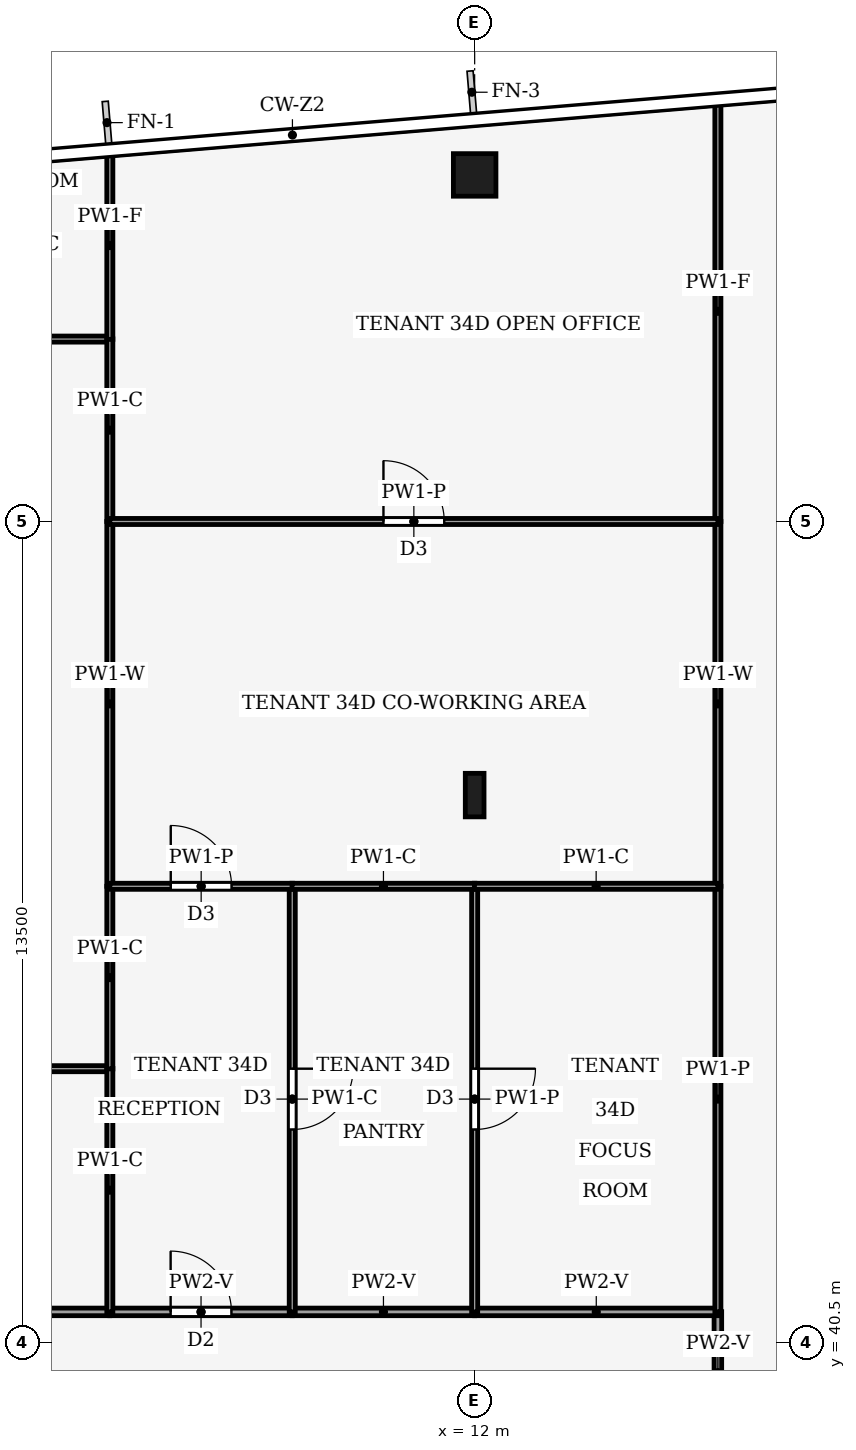
"""IFC4 building model, lengths in metres.
Left out: names, types, materials, properties, quantities, classifications, styles, units other than length and angle.
Written with IfcOpenShell. Run it as: python <this file> out.ifc"""

import sys

from ifc_helpers import new_model, si_unit, direction, frame, frame_2d, origin, origin_2d, place, context, subcontext, project, spatial, rectangle, hollow_rectangle, i_section, extrude, element, fill, save


model = new_model("IFC4")
c1 = context("Model", 3, precision=1e-05, world=origin(), true_north=direction((0.0, 1.0)))
c2 = subcontext(c1, "Body", "Model", "MODEL_VIEW")
j1 = project(units=[si_unit("LENGTHUNIT", "METRE"), si_unit("PLANEANGLEUNIT", "RADIAN")], contexts=[c1])
p1 = place(None, origin())
s1 = spatial("IfcSite", under=j1, at=p1, CompositionType="ELEMENT")
p2 = place(p1, origin())
s2 = spatial("IfcBuilding", under=s1, at=p2, CompositionType="ELEMENT")
p3 = place(p2, frame((0.0, 0.0, 150.0)))
s3 = spatial("IfcBuildingStorey", under=s2, at=p3, CompositionType="ELEMENT", Elevation=150.0)
p4 = place(p3, frame((12.0, 59.7, 0.0), z_axis=(0.0, 0.0, 1.0), x_axis=(1.0, 0.0, 0.0)))
e1 = element("IfcColumn", 1, at=p4, inside=s3, PredefinedType="COLUMN", context=c2, shape_type="SweptSolid", body=[
    extrude(hollow_rectangle(XDim=0.7, YDim=0.7, WallThickness=0.03, at=origin_2d()), origin(), (0.0, 0.0, 1.0), 4.0),
])
p5 = place(p3, frame((12.0, 49.5, 0.0), z_axis=(0.0, 0.0, 1.0), x_axis=(1.0, 0.0, 0.0)))
e2 = element("IfcColumn", 2, at=p5, inside=s3, PredefinedType="COLUMN", context=c2, shape_type="SweptSolid", body=[
    extrude(i_section(OverallWidth=0.308, OverallDepth=0.716, WebThickness=0.021, FlangeThickness=0.04, FilletRadius=0.027, at=origin_2d()), origin(), (0.0, 0.0, 1.0), 4.0),
])
p6 = place(p3, frame((16.0, 39.0, 0.0), z_axis=(0.0, 0.0, 1.0), x_axis=(0.0, 1.0, 0.0)))
e3 = element("IfcWall", 3, at=p6, inside=s3, PredefinedType="PARTITIONING", context=c2, shape_type="SweptSolid", body=[
    extrude(rectangle(XDim=2.004, YDim=0.125, at=frame_2d((1.002, 0.0))), origin(), (0.0, 0.0, 1.0), 3.44),
])
p7 = place(p3, frame((-6.0, 41.0, 0.0), z_axis=(0.0, 0.0, 1.0), x_axis=(1.0, 0.0, 0.0)))
e4 = element("IfcWall", 4, at=p7, inside=s3, PredefinedType="PARTITIONING", context=c2, shape_type="SweptSolid", body=[
    extrude(rectangle(XDim=12.0, YDim=0.125, at=frame_2d((6.0, 0.0))), origin(), (0.0, 0.0, 1.0), 3.44),
])
p8 = place(p7, frame((5.5, 0.0, 0.0)))
e5 = element("IfcOpeningElement", 5, at=p8, cuts=e4, PredefinedType="OPENING", context=c2, shape_type="SweptSolid", body=[
    extrude(rectangle(XDim=1.0, YDim=2.1, at=frame_2d((0.5, 1.05))), frame((0.0, 0.073, 0.0), z_axis=(0.0, -1.0, 0.0), x_axis=(1.0, 0.0, 0.0)), (0.0, 0.0, 1.0), 0.145),
])
p9 = place(p3, frame((6.0, 41.0, 0.0), z_axis=(0.0, 0.0, 1.0), x_axis=(1.0, 0.0, 0.0)))
e6 = element("IfcWall", 6, at=p9, inside=s3, PredefinedType="PARTITIONING", context=c2, shape_type="SweptSolid", body=[
    extrude(rectangle(XDim=3.0, YDim=0.125, at=frame_2d((1.5, 0.0))), origin(), (0.0, 0.0, 1.0), 3.44),
])
p10 = place(p9, frame((1.0, 0.0, 0.0)))
e7 = element("IfcOpeningElement", 7, at=p10, cuts=e6, PredefinedType="OPENING", context=c2, shape_type="SweptSolid", body=[
    extrude(rectangle(XDim=1.0, YDim=2.1, at=frame_2d((0.5, 1.05))), frame((0.0, 0.073, 0.0), z_axis=(0.0, -1.0, 0.0), x_axis=(1.0, 0.0, 0.0)), (0.0, 0.0, 1.0), 0.145),
])
p11 = place(p3, frame((12.0, 41.0, 0.0), z_axis=(0.0, 0.0, 1.0), x_axis=(-1.0, 0.0, 0.0)))
e8 = element("IfcWall", 8, at=p11, inside=s3, PredefinedType="PARTITIONING", context=c2, shape_type="SweptSolid", body=[
    extrude(rectangle(XDim=3.0, YDim=0.125, at=frame_2d((1.5, 0.0))), origin(), (0.0, 0.0, 1.0), 3.44),
])
p12 = place(p3, frame((16.0, 41.0, 0.0), z_axis=(0.0, 0.0, 1.0), x_axis=(-1.0, 0.0, 0.0)))
e9 = element("IfcWall", 9, at=p12, inside=s3, PredefinedType="PARTITIONING", context=c2, shape_type="SweptSolid", body=[
    extrude(rectangle(XDim=4.0, YDim=0.125, at=frame_2d((2.0, 0.0))), origin(), (0.0, 0.0, 1.0), 3.44),
])
p13 = place(p3, frame((16.0, 48.0, 0.0), z_axis=(0.0, 0.0, 1.0), x_axis=(0.0, -1.0, 0.0)))
e10 = element("IfcWall", 10, at=p13, inside=s3, PredefinedType="PARTITIONING", context=c2, shape_type="SweptSolid", body=[
    extrude(rectangle(XDim=7.0, YDim=0.1, at=frame_2d((3.5, 0.0))), origin(), (0.0, 0.0, 1.0), 3.44),
])
p14 = place(p3, frame((16.0, 54.0, 0.0), z_axis=(0.0, 0.0, 1.0), x_axis=(0.0, -1.0, 0.0)))
e11 = element("IfcWall", 11, at=p14, inside=s3, PredefinedType="PARTITIONING", context=c2, shape_type="SweptSolid", body=[
    extrude(rectangle(XDim=6.0, YDim=0.1, at=frame_2d((3.0, 0.0))), origin(), (0.0, 0.0, 1.0), 3.24),
])
p15 = place(p3, frame((16.0, 60.913, 0.0), z_axis=(0.0, 0.0, 1.0), x_axis=(0.0, -1.0, 0.0)))
e12 = element("IfcWall", 12, at=p15, inside=s3, PredefinedType="PARTITIONING", context=c2, shape_type="SweptSolid", body=[
    extrude(rectangle(XDim=6.913, YDim=0.1, at=frame_2d((3.457, 0.0))), origin(), (0.0, 0.0, 1.0), 3.04),
])
p16 = place(p3, frame((-6.004, 45.0, 0.0), z_axis=(0.0, 0.0, 1.0), x_axis=(1.0, 0.0, 0.0)))
e13 = element("IfcWall", 13, at=p16, inside=s3, PredefinedType="PARTITIONING", context=c2, shape_type="SweptSolid", body=[
    extrude(rectangle(XDim=12.004, YDim=0.1, at=frame_2d((6.002, 0.0))), origin(), (0.0, 0.0, 1.0), 3.44),
])
p17 = place(p16, frame((5.102, 0.0, 0.0)))
e14 = element("IfcOpeningElement", 14, at=p17, cuts=e13, PredefinedType="OPENING", context=c2, shape_type="SweptSolid", body=[
    extrude(rectangle(XDim=1.8, YDim=2.1, at=frame_2d((0.9, 1.05))), frame((0.0, 0.06, 0.0), z_axis=(0.0, -1.0, 0.0), x_axis=(1.0, 0.0, 0.0)), (0.0, 0.0, 1.0), 0.12),
])
p18 = place(p3, frame((6.0, 41.0, 0.0), z_axis=(0.0, 0.0, 1.0), x_axis=(0.0, 1.0, 0.0)))
e15 = element("IfcWall", 15, at=p18, inside=s3, PredefinedType="PARTITIONING", context=c2, shape_type="SweptSolid", body=[
    extrude(rectangle(XDim=4.004, YDim=0.1, at=frame_2d((2.002, 0.0))), origin(), (0.0, 0.0, 1.0), 3.87),
])
p19 = place(p3, frame((0.0, 57.0, 0.0), z_axis=(0.0, 0.0, 1.0), x_axis=(1.0, 0.0, 0.0)))
e16 = element("IfcWall", 16, at=p19, inside=s3, PredefinedType="PARTITIONING", context=c2, shape_type="SweptSolid", body=[
    extrude(rectangle(XDim=6.0, YDim=0.1, at=frame_2d((3.0, 0.0))), origin(), (0.0, 0.0, 1.0), 3.44),
])
p20 = place(p19, frame((3.7, 0.0, 0.0)))
e17 = element("IfcOpeningElement", 17, at=p20, cuts=e16, PredefinedType="OPENING", context=c2, shape_type="SweptSolid", body=[
    extrude(rectangle(XDim=1.0, YDim=2.1, at=frame_2d((0.5, 1.05))), frame((0.0, 0.06, 0.0), z_axis=(0.0, -1.0, 0.0), x_axis=(1.0, 0.0, 0.0)), (0.0, 0.0, 1.0), 0.12),
])
p21 = place(p3, frame((6.0, 44.996, 0.0), z_axis=(0.0, 0.0, 1.0), x_axis=(0.0, 1.0, 0.0)))
e18 = element("IfcWall", 18, at=p21, inside=s3, PredefinedType="PARTITIONING", context=c2, shape_type="SweptSolid", body=[
    extrude(rectangle(XDim=3.004, YDim=0.1, at=frame_2d((1.502, 0.0))), origin(), (0.0, 0.0, 1.0), 3.87),
])
p22 = place(p3, frame((6.0, 48.0, 0.0), z_axis=(0.0, 0.0, 1.0), x_axis=(0.0, 1.0, 0.0)))
e19 = element("IfcWall", 19, at=p22, inside=s3, PredefinedType="PARTITIONING", context=c2, shape_type="SweptSolid", body=[
    extrude(rectangle(XDim=6.0, YDim=0.1, at=frame_2d((3.0, 0.0))), origin(), (0.0, 0.0, 1.0), 3.24),
])
p23 = place(p3, frame((6.0, 54.0, 0.0), z_axis=(0.0, 0.0, 1.0), x_axis=(0.0, 1.0, 0.0)))
e20 = element("IfcWall", 20, at=p23, inside=s3, PredefinedType="PARTITIONING", context=c2, shape_type="SweptSolid", body=[
    extrude(rectangle(XDim=3.004, YDim=0.1, at=frame_2d((1.502, 0.0))), origin(), (0.0, 0.0, 1.0), 3.87),
])
p24 = place(p3, frame((6.0, 56.996, 0.0), z_axis=(0.0, 0.0, 1.0), x_axis=(0.0, 1.0, 0.0)))
e21 = element("IfcWall", 21, at=p24, inside=s3, PredefinedType="PARTITIONING", context=c2, shape_type="SweptSolid", body=[
    extrude(rectangle(XDim=3.084, YDim=0.1, at=frame_2d((1.542, 0.0))), origin(), (0.0, 0.0, 1.0), 3.04),
])
p25 = place(p3, frame((9.0, 48.0, 0.0), z_axis=(0.0, 0.0, 1.0), x_axis=(0.0, -1.0, 0.0)))
e22 = element("IfcWall", 22, at=p25, inside=s3, PredefinedType="PARTITIONING", context=c2, shape_type="SweptSolid", body=[
    extrude(rectangle(XDim=7.0, YDim=0.1, at=frame_2d((3.5, 0.0))), origin(), (0.0, 0.0, 1.0), 3.87),
])
p26 = place(p25, frame((3.0, 0.0, 0.0)))
e23 = element("IfcOpeningElement", 23, at=p26, cuts=e22, PredefinedType="OPENING", context=c2, shape_type="SweptSolid", body=[
    extrude(rectangle(XDim=1.0, YDim=2.1, at=frame_2d((0.5, 1.05))), frame((0.0, 0.06, 0.0), z_axis=(0.0, -1.0, 0.0), x_axis=(1.0, 0.0, 0.0)), (0.0, 0.0, 1.0), 0.12),
])
p27 = place(p3, frame((6.0, 48.0, 0.0), z_axis=(0.0, 0.0, 1.0), x_axis=(1.0, 0.0, 0.0)))
e24 = element("IfcWall", 24, at=p27, inside=s3, PredefinedType="PARTITIONING", context=c2, shape_type="SweptSolid", body=[
    extrude(rectangle(XDim=3.004, YDim=0.1, at=frame_2d((1.502, 0.0))), origin(), (0.0, 0.0, 1.0), 3.44),
])
p28 = place(p27, frame((1.002, 0.0, 0.0)))
e25 = element("IfcOpeningElement", 25, at=p28, cuts=e24, PredefinedType="OPENING", context=c2, shape_type="SweptSolid", body=[
    extrude(rectangle(XDim=1.0, YDim=2.1, at=frame_2d((0.5, 1.05))), frame((0.0, 0.06, 0.0), z_axis=(0.0, -1.0, 0.0), x_axis=(1.0, 0.0, 0.0)), (0.0, 0.0, 1.0), 0.12),
])
p29 = place(p3, frame((12.0, 48.0, 0.0), z_axis=(0.0, 0.0, 1.0), x_axis=(0.0, -1.0, 0.0)))
e26 = element("IfcWall", 26, at=p29, inside=s3, PredefinedType="PARTITIONING", context=c2, shape_type="SweptSolid", body=[
    extrude(rectangle(XDim=7.0, YDim=0.1, at=frame_2d((3.5, 0.0))), origin(), (0.0, 0.0, 1.0), 3.44),
])
p30 = place(p29, frame((3.0, 0.0, 0.0)))
e27 = element("IfcOpeningElement", 27, at=p30, cuts=e26, PredefinedType="OPENING", context=c2, shape_type="SweptSolid", body=[
    extrude(rectangle(XDim=1.0, YDim=2.1, at=frame_2d((0.5, 1.05))), frame((0.0, 0.06, 0.0), z_axis=(0.0, -1.0, 0.0), x_axis=(1.0, 0.0, 0.0)), (0.0, 0.0, 1.0), 0.12),
])
p31 = place(p3, frame((12.004, 48.0, 0.0), z_axis=(0.0, 0.0, 1.0), x_axis=(-1.0, 0.0, 0.0)))
e28 = element("IfcWall", 28, at=p31, inside=s3, PredefinedType="PARTITIONING", context=c2, shape_type="SweptSolid", body=[
    extrude(rectangle(XDim=3.008, YDim=0.1, at=frame_2d((1.504, 0.0))), origin(), (0.0, 0.0, 1.0), 3.87),
])
p32 = place(p3, frame((16.0, 48.0, 0.0), z_axis=(0.0, 0.0, 1.0), x_axis=(-1.0, 0.0, 0.0)))
e29 = element("IfcWall", 29, at=p32, inside=s3, PredefinedType="PARTITIONING", context=c2, shape_type="SweptSolid", body=[
    extrude(rectangle(XDim=4.004, YDim=0.1, at=frame_2d((2.002, 0.0))), origin(), (0.0, 0.0, 1.0), 3.87),
])
p33 = place(p3, frame((6.0, 54.0, 0.0), z_axis=(0.0, 0.0, 1.0), x_axis=(1.0, 0.0, 0.0)))
e30 = element("IfcWall", 30, at=p33, inside=s3, PredefinedType="PARTITIONING", context=c2, shape_type="SweptSolid", body=[
    extrude(rectangle(XDim=10.0, YDim=0.1, at=frame_2d((5.0, 0.0))), origin(), (0.0, 0.0, 1.0), 3.44),
])
p34 = place(p33, frame((4.5, 0.0, 0.0)))
e31 = element("IfcOpeningElement", 31, at=p34, cuts=e30, PredefinedType="OPENING", context=c2, shape_type="SweptSolid", body=[
    extrude(rectangle(XDim=1.0, YDim=2.1, at=frame_2d((0.5, 1.05))), frame((0.0, 0.06, 0.0), z_axis=(0.0, -1.0, 0.0), x_axis=(1.0, 0.0, 0.0)), (0.0, 0.0, 1.0), 0.12),
])
p35 = place(p10, origin())
e32 = element("IfcDoor", 32, at=p35, inside=s3, OperationType="SINGLE_SWING_LEFT", PredefinedType="DOOR", context=c2, shape_type="SweptSolid", body=[
    extrude(rectangle(XDim=1.0, YDim=2.1, at=frame_2d((0.5, 1.05))), frame((0.0, 0.025, 0.0), z_axis=(0.0, -1.0, 0.0), x_axis=(1.0, 0.0, 0.0)), (0.0, 0.0, 1.0), 0.05),
])
fill(e7, e32)
p36 = place(p26, origin())
e33 = element("IfcDoor", 33, at=p36, inside=s3, OperationType="SINGLE_SWING_RIGHT", PredefinedType="DOOR", context=c2, shape_type="SweptSolid", body=[
    extrude(rectangle(XDim=1.0, YDim=2.1, at=frame_2d((0.5, 1.05))), frame((0.0, 0.025, 0.0), z_axis=(0.0, -1.0, 0.0), x_axis=(1.0, 0.0, 0.0)), (0.0, 0.0, 1.0), 0.05),
])
fill(e23, e33)
p37 = place(p28, origin())
e34 = element("IfcDoor", 34, at=p37, inside=s3, OperationType="SINGLE_SWING_LEFT", PredefinedType="DOOR", context=c2, shape_type="SweptSolid", body=[
    extrude(rectangle(XDim=1.0, YDim=2.1, at=frame_2d((0.5, 1.05))), frame((0.0, 0.025, 0.0), z_axis=(0.0, -1.0, 0.0), x_axis=(1.0, 0.0, 0.0)), (0.0, 0.0, 1.0), 0.05),
])
fill(e25, e34)
p38 = place(p30, origin())
e35 = element("IfcDoor", 35, at=p38, inside=s3, OperationType="SINGLE_SWING_RIGHT", PredefinedType="DOOR", context=c2, shape_type="SweptSolid", body=[
    extrude(rectangle(XDim=1.0, YDim=2.1, at=frame_2d((0.5, 1.05))), frame((0.0, 0.025, 0.0), z_axis=(0.0, -1.0, 0.0), x_axis=(1.0, 0.0, 0.0)), (0.0, 0.0, 1.0), 0.05),
])
fill(e27, e35)
p39 = place(p34, origin())
e36 = element("IfcDoor", 36, at=p39, inside=s3, OperationType="SINGLE_SWING_LEFT", PredefinedType="DOOR", context=c2, shape_type="SweptSolid", body=[
    extrude(rectangle(XDim=1.0, YDim=2.1, at=frame_2d((0.5, 1.05))), frame((0.0, 0.025, 0.0), z_axis=(0.0, -1.0, 0.0), x_axis=(1.0, 0.0, 0.0)), (0.0, 0.0, 1.0), 0.05),
])
fill(e31, e36)
save(model, sys.argv[1])
